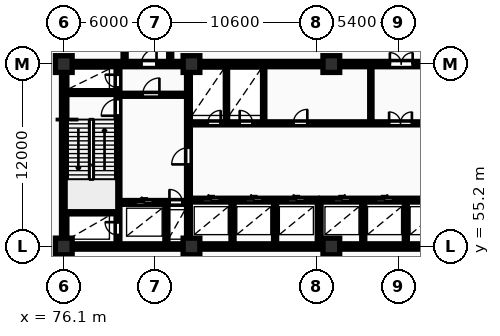
"""IFC4 building model, lengths in metres.
Left out: names, types, materials, properties, quantities, classifications, styles, units other than length and angle.
Written with IfcOpenShell. Run it as: python <this file> out.ifc"""

import sys

from ifc_helpers import new_model, si_unit, direction, frame, frame_2d, origin, origin_2d, place, context, subcontext, project, spatial, rectangle, extrude, element, fill, save


model = new_model("IFC4")
c1 = context("Model", 3, precision=1e-05, world=origin(), true_north=direction((0.0, 1.0)))
c2 = subcontext(c1, "Body", "Model", "MODEL_VIEW")
j1 = project(units=[si_unit("LENGTHUNIT", "METRE"), si_unit("PLANEANGLEUNIT", "RADIAN")], contexts=[c1])
p1 = place(None, origin())
s1 = spatial("IfcSite", under=j1, at=p1, CompositionType="ELEMENT")
p2 = place(p1, origin())
s2 = spatial("IfcBuilding", under=s1, at=p2, CompositionType="ELEMENT")
p3 = place(p2, origin())
s3 = spatial("IfcBuildingStorey", under=s2, at=p3, CompositionType="ELEMENT", Elevation=0.0)
for number, where, z_axis, x_axis in (
    (1, (76.1, 55.2, 0.0), (0.0, 0.0, 1.0), (1.0, 0.0, 0.0)),
    (2, (76.1, 67.2, 0.0), (0.0, 0.0, 1.0), (1.0, 0.0, 0.0)),
    (3, (84.5, 55.2, 0.0), (0.0, 0.0, 1.0), (1.0, 0.0, 0.0)),
    (4, (84.5, 67.2, 0.0), (0.0, 0.0, 1.0), (1.0, 0.0, 0.0)),
    (5, (93.7, 55.2, 0.0), (0.0, 0.0, 1.0), (1.0, 0.0, 0.0)),
    (6, (93.7, 67.2, 0.0), (0.0, 0.0, 1.0), (1.0, 0.0, 0.0)),
):
    element("IfcColumn", number, at=place(p3, frame(where, z_axis=z_axis, x_axis=x_axis)), inside=s3, PredefinedType="COLUMN", context=c2, shape_type="SweptSolid", body=[
        extrude(rectangle(XDim=1.1, YDim=1.1, at=origin_2d()), origin(), (0.0, 0.0, 1.0), 5.4),
    ])
p4 = place(p3, frame((75.95, 55.2, 0.0), z_axis=(0.0, 0.0, 1.0), x_axis=(1.0, 0.0, 0.0)))
e7 = element("IfcWall", 7, at=p4, inside=s3, PredefinedType="SHEAR", context=c2, shape_type="SweptSolid", body=[
    extrude(rectangle(XDim=36.3, YDim=0.35, at=frame_2d((18.15, 0.0))), origin(), (0.0, 0.0, 1.0), 5.4),
])
p5 = place(p3, frame((76.125, 55.375, 0.0), z_axis=(0.0, 0.0, 1.0), x_axis=(0.0, 1.0, 0.0)))
e8 = element("IfcWall", 8, at=p5, inside=s3, PredefinedType="SHEAR", context=c2, shape_type="SweptSolid", body=[
    extrude(rectangle(XDim=11.65, YDim=0.35, at=frame_2d((5.825, 0.0))), origin(), (0.0, 0.0, 1.0), 5.4),
])
p6 = place(p3, frame((75.95, 67.2, 0.0), z_axis=(0.0, 0.0, 1.0), x_axis=(1.0, 0.0, 0.0)))
e9 = element("IfcWall", 9, at=p6, inside=s3, PredefinedType="SHEAR", context=c2, shape_type="SweptSolid", body=[
    extrude(rectangle(XDim=36.3, YDim=0.35, at=frame_2d((18.15, 0.0))), origin(), (0.0, 0.0, 1.0), 5.4),
])
p7 = place(p6, frame((5.25, 0.0, 0.0)))
e10 = element("IfcOpeningElement", 10, at=p7, cuts=e9, PredefinedType="OPENING", context=c2, shape_type="SweptSolid", body=[
    extrude(rectangle(XDim=1.0, YDim=2.15, at=frame_2d((0.5, 1.075))), frame((0.0, 0.185, 0.0), z_axis=(0.0, -1.0, 0.0), x_axis=(1.0, 0.0, 0.0)), (0.0, 0.0, 1.0), 0.37),
])
p8 = place(p6, frame((21.6, 0.0, 0.0)))
e11 = element("IfcOpeningElement", 11, at=p8, cuts=e9, PredefinedType="OPENING", context=c2, shape_type="SweptSolid", body=[
    extrude(rectangle(XDim=1.5, YDim=2.2, at=frame_2d((0.75, 1.1))), frame((0.0, 0.185, 0.0), z_axis=(0.0, -1.0, 0.0), x_axis=(1.0, 0.0, 0.0)), (0.0, 0.0, 1.0), 0.37),
])
p9 = place(p6, frame((30.45, 0.0, 0.0)))
e12 = element("IfcOpeningElement", 12, at=p9, cuts=e9, PredefinedType="OPENING", context=c2, shape_type="SweptSolid", body=[
    extrude(rectangle(XDim=1.0, YDim=2.15, at=frame_2d((0.5, 1.075))), frame((0.0, 0.185, 0.0), z_axis=(0.0, -1.0, 0.0), x_axis=(1.0, 0.0, 0.0)), (0.0, 0.0, 1.0), 0.37),
])
p10 = place(p3, frame((79.665, 55.4, 0.0), z_axis=(0.0, 0.0, 1.0), x_axis=(0.0, 1.0, 0.0)))
e13 = element("IfcWall", 13, at=p10, inside=s3, PredefinedType="SHEAR", context=c2, shape_type="SweptSolid", body=[
    extrude(rectangle(XDim=11.6, YDim=0.25, at=frame_2d((5.8, 0.0))), origin(), (0.0, 0.0, 1.0), 5.4),
])
p11 = place(p10, frame((0.55, 0.0, 0.0)))
e14 = element("IfcOpeningElement", 14, at=p11, cuts=e13, PredefinedType="OPENING", context=c2, shape_type="SweptSolid", body=[
    extrude(rectangle(XDim=0.85, YDim=2.05, at=frame_2d((0.425, 1.025))), frame((0.0, 0.135, 0.0), z_axis=(0.0, -1.0, 0.0), x_axis=(1.0, 0.0, 0.0)), (0.0, 0.0, 1.0), 0.27),
])
p12 = place(p10, frame((8.4, 0.0, 0.0)))
e15 = element("IfcOpeningElement", 15, at=p12, cuts=e13, PredefinedType="OPENING", context=c2, shape_type="SweptSolid", body=[
    extrude(rectangle(XDim=1.1, YDim=2.1, at=frame_2d((0.55, 1.05))), frame((0.0, 0.135, 0.0), z_axis=(0.0, -1.0, 0.0), x_axis=(1.0, 0.0, 0.0)), (0.0, 0.0, 1.0), 0.27),
])
p13 = place(p10, frame((10.25, 0.0, 0.0)))
e16 = element("IfcOpeningElement", 16, at=p13, cuts=e13, PredefinedType="OPENING", context=c2, shape_type="SweptSolid", body=[
    extrude(rectangle(XDim=0.85, YDim=2.05, at=frame_2d((0.425, 1.025))), frame((0.0, 0.135, 0.0), z_axis=(0.0, -1.0, 0.0), x_axis=(1.0, 0.0, 0.0)), (0.0, 0.0, 1.0), 0.27),
])
for number, where, z_axis, x_axis in (
    (17, (76.3, 57.475, 0.0), (0.0, 0.0, 1.0), (1.0, 0.0, 0.0)),
    (18, (76.3, 65.325, 0.0), (0.0, 0.0, 1.0), (1.0, 0.0, 0.0)),
):
    element("IfcWall", number, at=place(p3, frame(where, z_axis=z_axis, x_axis=x_axis)), inside=s3, PredefinedType="SHEAR", context=c2, shape_type="SweptSolid", body=[
        extrude(rectangle(XDim=3.24, YDim=0.25, at=frame_2d((1.62, 0.0))), origin(), (0.0, 0.0, 1.0), 5.4),
    ])
p14 = place(p3, frame((79.79, 58.1, 0.0), z_axis=(0.0, 0.0, 1.0), x_axis=(1.0, 0.0, 0.0)))
e19 = element("IfcWall", 19, at=p14, inside=s3, PredefinedType="SHEAR", context=c2, shape_type="SweptSolid", body=[
    extrude(rectangle(XDim=4.39, YDim=0.25, at=frame_2d((2.195, 0.0))), origin(), (0.0, 0.0, 1.0), 5.4),
])
p15 = place(p14, frame((1.05, 0.0, 0.0)))
e20 = element("IfcOpeningElement", 20, at=p15, cuts=e19, PredefinedType="OPENING", context=c2, shape_type="SweptSolid", body=[
    extrude(rectangle(XDim=1.12, YDim=2.12, at=frame_2d((0.56, 1.06))), frame((0.0, 0.135, 0.0), z_axis=(0.0, -1.0, 0.0), x_axis=(1.0, 0.0, 0.0)), (0.0, 0.0, 1.0), 0.27),
])
p16 = place(p14, frame((3.26, 0.0, 0.0)))
e21 = element("IfcOpeningElement", 21, at=p16, cuts=e19, PredefinedType="OPENING", context=c2, shape_type="SweptSolid", body=[
    extrude(rectangle(XDim=0.85, YDim=2.05, at=frame_2d((0.425, 1.025))), frame((0.0, 0.135, 0.0), z_axis=(0.0, -1.0, 0.0), x_axis=(1.0, 0.0, 0.0)), (0.0, 0.0, 1.0), 0.27),
])
p17 = place(p3, frame((82.85, 55.4, 0.0), z_axis=(0.0, 0.0, 1.0), x_axis=(0.0, 1.0, 0.0)))
e22 = element("IfcWall", 22, at=p17, inside=s3, PredefinedType="PARTITIONING", context=c2, shape_type="SweptSolid", body=[
    extrude(rectangle(XDim=2.56, YDim=0.2, at=frame_2d((1.28, 0.0))), origin(), (0.0, 0.0, 1.0), 5.1),
])
p18 = place(p3, frame((79.79, 65.18, 0.0), z_axis=(0.0, 0.0, 1.0), x_axis=(1.0, 0.0, 0.0)))
e23 = element("IfcWall", 23, at=p18, inside=s3, PredefinedType="PARTITIONING", context=c2, shape_type="SweptSolid", body=[
    extrude(rectangle(XDim=4.39, YDim=0.2, at=frame_2d((2.195, 0.0))), origin(), (0.0, 0.0, 1.0), 5.1),
])
p19 = place(p18, frame((1.5, 0.0, 0.0)))
e24 = element("IfcOpeningElement", 24, at=p19, cuts=e23, PredefinedType="OPENING", context=c2, shape_type="SweptSolid", body=[
    extrude(rectangle(XDim=1.1, YDim=2.1, at=frame_2d((0.55, 1.05))), frame((0.0, 0.11, 0.0), z_axis=(0.0, -1.0, 0.0), x_axis=(1.0, 0.0, 0.0)), (0.0, 0.0, 1.0), 0.22),
])
p20 = place(p3, frame((84.3, 55.4, 0.0), z_axis=(0.0, 0.0, 1.0), x_axis=(0.0, 1.0, 0.0)))
e25 = element("IfcWall", 25, at=p20, inside=s3, PredefinedType="SHEAR", context=c2, shape_type="SweptSolid", body=[
    extrude(rectangle(XDim=11.6, YDim=0.25, at=frame_2d((5.8, 0.0))), origin(), (0.0, 0.0, 1.0), 5.4),
])
p21 = place(p20, frame((5.2, 0.0, 0.0)))
e26 = element("IfcOpeningElement", 26, at=p21, cuts=e25, PredefinedType="OPENING", context=c2, shape_type="SweptSolid", body=[
    extrude(rectangle(XDim=1.1, YDim=2.1, at=frame_2d((0.55, 1.05))), frame((0.0, 0.135, 0.0), z_axis=(0.0, -1.0, 0.0), x_axis=(1.0, 0.0, 0.0)), (0.0, 0.0, 1.0), 0.27),
])
for number, where, z_axis, x_axis in (
    (27, (87.2, 55.4, 0.0), (0.0, 0.0, 1.0), (0.0, 1.0, 0.0)),
    (28, (90.0, 55.4, 0.0), (0.0, 0.0, 1.0), (0.0, 1.0, 0.0)),
):
    element("IfcWall", number, at=place(p3, frame(where, z_axis=z_axis, x_axis=x_axis)), inside=s3, PredefinedType="PARTITIONING", context=c2, shape_type="SweptSolid", body=[
        extrude(rectangle(XDim=2.72, YDim=0.2, at=frame_2d((1.36, 0.0))), origin(), (0.0, 0.0, 1.0), 5.1),
    ])
p22 = place(p3, frame((84.42, 58.25, 0.0), z_axis=(0.0, 0.0, 1.0), x_axis=(1.0, 0.0, 0.0)))
e29 = element("IfcWall", 29, at=p22, inside=s3, PredefinedType="SHEAR", context=c2, shape_type="SweptSolid", body=[
    extrude(rectangle(XDim=8.36, YDim=0.25, at=frame_2d((4.18, 0.0))), origin(), (0.0, 0.0, 1.0), 5.4),
])
p23 = place(p22, frame((0.82, 0.0, 0.0)))
e30 = element("IfcOpeningElement", 30, at=p23, cuts=e29, PredefinedType="OPENING", context=c2, shape_type="SweptSolid", body=[
    extrude(rectangle(XDim=1.12, YDim=2.12, at=frame_2d((0.56, 1.06))), frame((0.0, 0.135, 0.0), z_axis=(0.0, -1.0, 0.0), x_axis=(1.0, 0.0, 0.0)), (0.0, 0.0, 1.0), 0.27),
])
p24 = place(p22, frame((3.62, 0.0, 0.0)))
e31 = element("IfcOpeningElement", 31, at=p24, cuts=e29, PredefinedType="OPENING", context=c2, shape_type="SweptSolid", body=[
    extrude(rectangle(XDim=1.12, YDim=2.12, at=frame_2d((0.56, 1.06))), frame((0.0, 0.135, 0.0), z_axis=(0.0, -1.0, 0.0), x_axis=(1.0, 0.0, 0.0)), (0.0, 0.0, 1.0), 0.27),
])
p25 = place(p22, frame((6.42, 0.0, 0.0)))
e32 = element("IfcOpeningElement", 32, at=p25, cuts=e29, PredefinedType="OPENING", context=c2, shape_type="SweptSolid", body=[
    extrude(rectangle(XDim=1.12, YDim=2.12, at=frame_2d((0.56, 1.06))), frame((0.0, 0.135, 0.0), z_axis=(0.0, -1.0, 0.0), x_axis=(1.0, 0.0, 0.0)), (0.0, 0.0, 1.0), 0.27),
])
p26 = place(p3, frame((92.9, 55.4, 0.0), z_axis=(0.0, 0.0, 1.0), x_axis=(0.0, 1.0, 0.0)))
e33 = element("IfcWall", 33, at=p26, inside=s3, PredefinedType="SHEAR", context=c2, shape_type="SweptSolid", body=[
    extrude(rectangle(XDim=2.85, YDim=0.25, at=frame_2d((1.425, 0.0))), origin(), (0.0, 0.0, 1.0), 5.4),
])
for number, where, z_axis, x_axis in (
    (34, (95.8, 55.4, 0.0), (0.0, 0.0, 1.0), (0.0, 1.0, 0.0)),
    (35, (98.6, 55.4, 0.0), (0.0, 0.0, 1.0), (0.0, 1.0, 0.0)),
):
    element("IfcWall", number, at=place(p3, frame(where, z_axis=z_axis, x_axis=x_axis)), inside=s3, PredefinedType="PARTITIONING", context=c2, shape_type="SweptSolid", body=[
        extrude(rectangle(XDim=2.72, YDim=0.2, at=frame_2d((1.36, 0.0))), origin(), (0.0, 0.0, 1.0), 5.1),
    ])
p27 = place(p3, frame((93.02, 58.25, 0.0), z_axis=(0.0, 0.0, 1.0), x_axis=(1.0, 0.0, 0.0)))
e36 = element("IfcWall", 36, at=p27, inside=s3, PredefinedType="SHEAR", context=c2, shape_type="SweptSolid", body=[
    extrude(rectangle(XDim=8.36, YDim=0.25, at=frame_2d((4.18, 0.0))), origin(), (0.0, 0.0, 1.0), 5.4),
])
p28 = place(p27, frame((0.82, 0.0, 0.0)))
e37 = element("IfcOpeningElement", 37, at=p28, cuts=e36, PredefinedType="OPENING", context=c2, shape_type="SweptSolid", body=[
    extrude(rectangle(XDim=1.12, YDim=2.12, at=frame_2d((0.56, 1.06))), frame((0.0, 0.135, 0.0), z_axis=(0.0, -1.0, 0.0), x_axis=(1.0, 0.0, 0.0)), (0.0, 0.0, 1.0), 0.27),
])
p29 = place(p27, frame((3.62, 0.0, 0.0)))
e38 = element("IfcOpeningElement", 38, at=p29, cuts=e36, PredefinedType="OPENING", context=c2, shape_type="SweptSolid", body=[
    extrude(rectangle(XDim=1.12, YDim=2.12, at=frame_2d((0.56, 1.06))), frame((0.0, 0.135, 0.0), z_axis=(0.0, -1.0, 0.0), x_axis=(1.0, 0.0, 0.0)), (0.0, 0.0, 1.0), 0.27),
])
p30 = place(p27, frame((6.42, 0.0, 0.0)))
e39 = element("IfcOpeningElement", 39, at=p30, cuts=e36, PredefinedType="OPENING", context=c2, shape_type="SweptSolid", body=[
    extrude(rectangle(XDim=1.12, YDim=2.12, at=frame_2d((0.56, 1.06))), frame((0.0, 0.135, 0.0), z_axis=(0.0, -1.0, 0.0), x_axis=(1.0, 0.0, 0.0)), (0.0, 0.0, 1.0), 0.27),
])
for number, where, z_axis, x_axis in (
    (40, (86.8, 63.4, 0.0), (0.0, 0.0, 1.0), (0.0, 1.0, 0.0)),
    (41, (89.25, 63.4, 0.0), (0.0, 0.0, 1.0), (0.0, 1.0, 0.0)),
    (42, (96.3, 63.4, 0.0), (0.0, 0.0, 1.0), (0.0, 1.0, 0.0)),
):
    element("IfcWall", number, at=place(p3, frame(where, z_axis=z_axis, x_axis=x_axis)), inside=s3, PredefinedType="PARTITIONING", context=c2, shape_type="SweptSolid", body=[
        extrude(rectangle(XDim=3.6, YDim=0.15, at=frame_2d((1.8, 0.0))), origin(), (0.0, 0.0, 1.0), 5.1),
    ])
p31 = place(p3, frame((84.42, 63.3, 0.0), z_axis=(0.0, 0.0, 1.0), x_axis=(1.0, 0.0, 0.0)))
e43 = element("IfcWall", 43, at=p31, inside=s3, PredefinedType="PARTITIONING", context=c2, shape_type="SweptSolid", body=[
    extrude(rectangle(XDim=19.83, YDim=0.2, at=frame_2d((9.915, 0.0))), origin(), (0.0, 0.0, 1.0), 5.1),
])
p32 = place(p31, frame((1.15, 0.0, 0.0)))
e44 = element("IfcOpeningElement", 44, at=p32, cuts=e43, PredefinedType="OPENING", context=c2, shape_type="SweptSolid", body=[
    extrude(rectangle(XDim=0.85, YDim=2.05, at=frame_2d((0.425, 1.025))), frame((0.0, 0.11, 0.0), z_axis=(0.0, -1.0, 0.0), x_axis=(1.0, 0.0, 0.0)), (0.0, 0.0, 1.0), 0.22),
])
p33 = place(p31, frame((3.25, 0.0, 0.0)))
e45 = element("IfcOpeningElement", 45, at=p33, cuts=e43, PredefinedType="OPENING", context=c2, shape_type="SweptSolid", body=[
    extrude(rectangle(XDim=0.85, YDim=2.05, at=frame_2d((0.425, 1.025))), frame((0.0, 0.11, 0.0), z_axis=(0.0, -1.0, 0.0), x_axis=(1.0, 0.0, 0.0)), (0.0, 0.0, 1.0), 0.22),
])
p34 = place(p31, frame((13.08, 0.0, 0.0)))
e46 = element("IfcOpeningElement", 46, at=p34, cuts=e43, PredefinedType="OPENING", context=c2, shape_type="SweptSolid", body=[
    extrude(rectangle(XDim=1.5, YDim=2.2, at=frame_2d((0.75, 1.1))), frame((0.0, 0.11, 0.0), z_axis=(0.0, -1.0, 0.0), x_axis=(1.0, 0.0, 0.0)), (0.0, 0.0, 1.0), 0.22),
])
p35 = place(p31, frame((6.78, 0.0, 0.0)))
e47 = element("IfcOpeningElement", 47, at=p35, cuts=e43, PredefinedType="OPENING", context=c2, shape_type="SweptSolid", body=[
    extrude(rectangle(XDim=0.92, YDim=2.08, at=frame_2d((0.46, 1.04))), frame((0.0, 0.11, 0.0), z_axis=(0.0, -1.0, 0.0), x_axis=(1.0, 0.0, 0.0)), (0.0, 0.0, 1.0), 0.22),
])
p36 = place(p31, frame((16.28, 0.0, 0.0)))
e48 = element("IfcOpeningElement", 48, at=p36, cuts=e43, PredefinedType="OPENING", context=c2, shape_type="SweptSolid", body=[
    extrude(rectangle(XDim=0.92, YDim=2.08, at=frame_2d((0.46, 1.04))), frame((0.0, 0.11, 0.0), z_axis=(0.0, -1.0, 0.0), x_axis=(1.0, 0.0, 0.0)), (0.0, 0.0, 1.0), 0.22),
])
p37 = place(p3, frame((80.1, 67.45, 0.0), z_axis=(0.0, 0.0, 1.0), x_axis=(0.0, 1.0, 0.0)))
e49 = element("IfcWall", 49, at=p37, inside=s3, PredefinedType="PARTITIONING", context=c2, shape_type="SweptSolid", body=[
    extrude(rectangle(XDim=41.45, YDim=0.2, at=frame_2d((20.725, 0.0))), origin(), (0.0, 0.0, 1.0), 5.1),
])
p38 = place(p3, frame((83.1, 67.45, 0.0), z_axis=(0.0, 0.0, 1.0), x_axis=(0.0, 1.0, 0.0)))
e50 = element("IfcWall", 50, at=p38, inside=s3, PredefinedType="PARTITIONING", context=c2, shape_type="SweptSolid", body=[
    extrude(rectangle(XDim=41.45, YDim=0.2, at=frame_2d((20.725, 0.0))), origin(), (0.0, 0.0, 1.0), 5.1),
])
p39 = place(p38, frame((16.0, 0.0, 0.0)))
e51 = element("IfcOpeningElement", 51, at=p39, cuts=e50, PredefinedType="OPENING", context=c2, shape_type="SweptSolid", body=[
    extrude(rectangle(XDim=1.1, YDim=2.1, at=frame_2d((0.55, 1.05))), frame((0.0, 0.11, 0.0), z_axis=(0.0, -1.0, 0.0), x_axis=(1.0, 0.0, 0.0)), (0.0, 0.0, 1.0), 0.22),
])
p40 = place(p7, origin())
e52 = element("IfcDoor", 52, at=p40, inside=s3, OperationType="SINGLE_SWING_RIGHT", PredefinedType="DOOR", context=c2, shape_type="SweptSolid", body=[
    extrude(rectangle(XDim=1.0, YDim=2.15, at=frame_2d((0.5, 1.075))), frame((0.0, 0.025, 0.0), z_axis=(0.0, -1.0, 0.0), x_axis=(1.0, 0.0, 0.0)), (0.0, 0.0, 1.0), 0.05),
])
fill(e10, e52)
p41 = place(p8, origin())
e53 = element("IfcDoor", 53, at=p41, inside=s3, OperationType="DOUBLE_DOOR_SINGLE_SWING", PredefinedType="DOOR", context=c2, shape_type="SweptSolid", body=[
    extrude(rectangle(XDim=1.5, YDim=2.2, at=frame_2d((0.75, 1.1))), frame((0.0, 0.025, 0.0), z_axis=(0.0, -1.0, 0.0), x_axis=(1.0, 0.0, 0.0)), (0.0, 0.0, 1.0), 0.05),
])
fill(e11, e53)
p42 = place(p11, origin())
e54 = element("IfcDoor", 54, at=p42, inside=s3, OperationType="SINGLE_SWING_RIGHT", PredefinedType="DOOR", context=c2, shape_type="SweptSolid", body=[
    extrude(rectangle(XDim=0.85, YDim=2.05, at=frame_2d((0.425, 1.025))), frame((0.0, 0.025, 0.0), z_axis=(0.0, -1.0, 0.0), x_axis=(1.0, 0.0, 0.0)), (0.0, 0.0, 1.0), 0.05),
])
fill(e14, e54)
p43 = place(p12, origin())
e55 = element("IfcDoor", 55, at=p43, inside=s3, OperationType="SINGLE_SWING_LEFT", PredefinedType="DOOR", context=c2, shape_type="SweptSolid", body=[
    extrude(rectangle(XDim=1.1, YDim=2.1, at=frame_2d((0.55, 1.05))), frame((0.0, 0.025, 0.0), z_axis=(0.0, -1.0, 0.0), x_axis=(1.0, 0.0, 0.0)), (0.0, 0.0, 1.0), 0.05),
])
fill(e15, e55)
p44 = place(p13, origin())
e56 = element("IfcDoor", 56, at=p44, inside=s3, OperationType="SINGLE_SWING_RIGHT", PredefinedType="DOOR", context=c2, shape_type="SweptSolid", body=[
    extrude(rectangle(XDim=0.85, YDim=2.05, at=frame_2d((0.425, 1.025))), frame((0.0, 0.025, 0.0), z_axis=(0.0, -1.0, 0.0), x_axis=(1.0, 0.0, 0.0)), (0.0, 0.0, 1.0), 0.05),
])
fill(e16, e56)
p45 = place(p15, origin())
e57 = element("IfcDoor", 57, at=p45, inside=s3, OperationType="SLIDING_TO_LEFT", PredefinedType="DOOR", context=c2, shape_type="SweptSolid", body=[
    extrude(rectangle(XDim=1.12, YDim=2.12, at=frame_2d((0.56, 1.06))), frame((0.0, 0.025, 0.0), z_axis=(0.0, -1.0, 0.0), x_axis=(1.0, 0.0, 0.0)), (0.0, 0.0, 1.0), 0.05),
])
fill(e20, e57)
p46 = place(p16, origin())
e58 = element("IfcDoor", 58, at=p46, inside=s3, OperationType="SINGLE_SWING_LEFT", PredefinedType="DOOR", context=c2, shape_type="SweptSolid", body=[
    extrude(rectangle(XDim=0.85, YDim=2.05, at=frame_2d((0.425, 1.025))), frame((0.0, 0.025, 0.0), z_axis=(0.0, -1.0, 0.0), x_axis=(1.0, 0.0, 0.0)), (0.0, 0.0, 1.0), 0.05),
])
fill(e21, e58)
p47 = place(p19, origin())
e59 = element("IfcDoor", 59, at=p47, inside=s3, OperationType="SINGLE_SWING_RIGHT", PredefinedType="DOOR", context=c2, shape_type="SweptSolid", body=[
    extrude(rectangle(XDim=1.1, YDim=2.1, at=frame_2d((0.55, 1.05))), frame((0.0, 0.025, 0.0), z_axis=(0.0, -1.0, 0.0), x_axis=(1.0, 0.0, 0.0)), (0.0, 0.0, 1.0), 0.05),
])
fill(e24, e59)
p48 = place(p21, origin())
e60 = element("IfcDoor", 60, at=p48, inside=s3, OperationType="SINGLE_SWING_LEFT", PredefinedType="DOOR", context=c2, shape_type="SweptSolid", body=[
    extrude(rectangle(XDim=1.1, YDim=2.1, at=frame_2d((0.55, 1.05))), frame((0.0, 0.025, 0.0), z_axis=(0.0, -1.0, 0.0), x_axis=(1.0, 0.0, 0.0)), (0.0, 0.0, 1.0), 0.05),
])
fill(e26, e60)
p49 = place(p23, origin())
e61 = element("IfcDoor", 61, at=p49, inside=s3, OperationType="SLIDING_TO_LEFT", PredefinedType="DOOR", context=c2, shape_type="SweptSolid", body=[
    extrude(rectangle(XDim=1.12, YDim=2.12, at=frame_2d((0.56, 1.06))), frame((0.0, 0.025, 0.0), z_axis=(0.0, -1.0, 0.0), x_axis=(1.0, 0.0, 0.0)), (0.0, 0.0, 1.0), 0.05),
])
fill(e30, e61)
p50 = place(p24, origin())
e62 = element("IfcDoor", 62, at=p50, inside=s3, OperationType="SLIDING_TO_LEFT", PredefinedType="DOOR", context=c2, shape_type="SweptSolid", body=[
    extrude(rectangle(XDim=1.12, YDim=2.12, at=frame_2d((0.56, 1.06))), frame((0.0, 0.025, 0.0), z_axis=(0.0, -1.0, 0.0), x_axis=(1.0, 0.0, 0.0)), (0.0, 0.0, 1.0), 0.05),
])
fill(e31, e62)
p51 = place(p25, origin())
e63 = element("IfcDoor", 63, at=p51, inside=s3, OperationType="SLIDING_TO_LEFT", PredefinedType="DOOR", context=c2, shape_type="SweptSolid", body=[
    extrude(rectangle(XDim=1.12, YDim=2.12, at=frame_2d((0.56, 1.06))), frame((0.0, 0.025, 0.0), z_axis=(0.0, -1.0, 0.0), x_axis=(1.0, 0.0, 0.0)), (0.0, 0.0, 1.0), 0.05),
])
fill(e32, e63)
p52 = place(p28, origin())
e64 = element("IfcDoor", 64, at=p52, inside=s3, OperationType="SLIDING_TO_RIGHT", PredefinedType="DOOR", context=c2, shape_type="SweptSolid", body=[
    extrude(rectangle(XDim=1.12, YDim=2.12, at=frame_2d((0.56, 1.06))), frame((0.0, 0.025, 0.0), z_axis=(0.0, -1.0, 0.0), x_axis=(1.0, 0.0, 0.0)), (0.0, 0.0, 1.0), 0.05),
])
fill(e37, e64)
p53 = place(p29, origin())
e65 = element("IfcDoor", 65, at=p53, inside=s3, OperationType="SLIDING_TO_RIGHT", PredefinedType="DOOR", context=c2, shape_type="SweptSolid", body=[
    extrude(rectangle(XDim=1.12, YDim=2.12, at=frame_2d((0.56, 1.06))), frame((0.0, 0.025, 0.0), z_axis=(0.0, -1.0, 0.0), x_axis=(1.0, 0.0, 0.0)), (0.0, 0.0, 1.0), 0.05),
])
fill(e38, e65)
p54 = place(p30, origin())
e66 = element("IfcDoor", 66, at=p54, inside=s3, OperationType="SLIDING_TO_RIGHT", PredefinedType="DOOR", context=c2, shape_type="SweptSolid", body=[
    extrude(rectangle(XDim=1.12, YDim=2.12, at=frame_2d((0.56, 1.06))), frame((0.0, 0.025, 0.0), z_axis=(0.0, -1.0, 0.0), x_axis=(1.0, 0.0, 0.0)), (0.0, 0.0, 1.0), 0.05),
])
fill(e39, e66)
p55 = place(p32, origin())
e67 = element("IfcDoor", 67, at=p55, inside=s3, OperationType="SINGLE_SWING_RIGHT", PredefinedType="DOOR", context=c2, shape_type="SweptSolid", body=[
    extrude(rectangle(XDim=0.85, YDim=2.05, at=frame_2d((0.425, 1.025))), frame((0.0, 0.025, 0.0), z_axis=(0.0, -1.0, 0.0), x_axis=(1.0, 0.0, 0.0)), (0.0, 0.0, 1.0), 0.05),
])
fill(e44, e67)
p56 = place(p33, origin())
e68 = element("IfcDoor", 68, at=p56, inside=s3, OperationType="SINGLE_SWING_LEFT", PredefinedType="DOOR", context=c2, shape_type="SweptSolid", body=[
    extrude(rectangle(XDim=0.85, YDim=2.05, at=frame_2d((0.425, 1.025))), frame((0.0, 0.025, 0.0), z_axis=(0.0, -1.0, 0.0), x_axis=(1.0, 0.0, 0.0)), (0.0, 0.0, 1.0), 0.05),
])
fill(e45, e68)
p57 = place(p34, origin())
e69 = element("IfcDoor", 69, at=p57, inside=s3, OperationType="DOUBLE_DOOR_SINGLE_SWING", PredefinedType="DOOR", context=c2, shape_type="SweptSolid", body=[
    extrude(rectangle(XDim=1.5, YDim=2.2, at=frame_2d((0.75, 1.1))), frame((0.0, 0.025, 0.0), z_axis=(0.0, -1.0, 0.0), x_axis=(1.0, 0.0, 0.0)), (0.0, 0.0, 1.0), 0.05),
])
fill(e46, e69)
p58 = place(p35, origin())
e70 = element("IfcDoor", 70, at=p58, inside=s3, OperationType="SINGLE_SWING_RIGHT", PredefinedType="DOOR", context=c2, shape_type="SweptSolid", body=[
    extrude(rectangle(XDim=0.92, YDim=2.08, at=frame_2d((0.46, 1.04))), frame((0.0, 0.025, 0.0), z_axis=(0.0, -1.0, 0.0), x_axis=(1.0, 0.0, 0.0)), (0.0, 0.0, 1.0), 0.05),
])
fill(e47, e70)
save(model, sys.argv[1])
